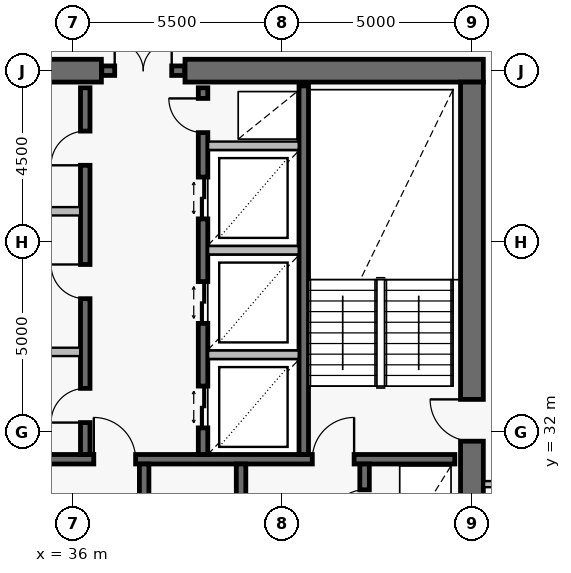
"""IFC4 building model, lengths in metres.
Left out: names, types, materials, properties, quantities, classifications, styles, units other than length and angle.
Written with IfcOpenShell. Run it as: python <this file> out.ifc"""

import sys

from ifc_helpers import new_model, si_unit, direction, frame, frame_2d, origin, place, context, subcontext, project, spatial, rectangle, extrude, element, fill, save


model = new_model("IFC4")
c1 = context("Model", 3, precision=1e-05, world=origin(), true_north=direction((0.0, 1.0)))
c2 = subcontext(c1, "Body", "Model", "MODEL_VIEW")
j1 = project(units=[si_unit("LENGTHUNIT", "METRE"), si_unit("PLANEANGLEUNIT", "RADIAN")], contexts=[c1])
p1 = place(None, origin())
s1 = spatial("IfcSite", under=j1, at=p1, CompositionType="ELEMENT")
p2 = place(p1, origin())
s2 = spatial("IfcBuilding", under=s1, at=p2, CompositionType="ELEMENT")
p3 = place(p2, frame((0.0, 0.0, 288.2)))
s3 = spatial("IfcBuildingStorey", under=s2, at=p3, CompositionType="ELEMENT", Elevation=288.2)
p4 = place(p3, frame((46.8, 41.5, 0.0), z_axis=(0.0, 0.0, 1.0), x_axis=(-1.0, 0.0, 0.0)))
e1 = element("IfcWall", 1, at=p4, inside=s3, PredefinedType="SHEAR", context=c2, shape_type="SweptSolid", body=[
    extrude(rectangle(XDim=7.85, YDim=0.6, at=frame_2d((3.925, 0.0))), origin(), (0.0, 0.0, 1.0), 3.8),
])
p5 = place(p3, frame((36.75, 41.5, 0.0), z_axis=(0.0, 0.0, 1.0), x_axis=(-1.0, 0.0, 0.0)))
e2 = element("IfcWall", 2, at=p5, inside=s3, PredefinedType="SHEAR", context=c2, shape_type="SweptSolid", body=[
    extrude(rectangle(XDim=11.55, YDim=0.6, at=frame_2d((5.775, 0.0))), origin(), (0.0, 0.0, 1.0), 3.8),
])
p6 = place(p5, frame((4.25, 0.0, 0.0)))
e3 = element("IfcOpeningElement", 3, at=p6, cuts=e2, PredefinedType="OPENING", context=c2, shape_type="SweptSolid", body=[
    extrude(rectangle(XDim=1.1, YDim=2.15, at=frame_2d((0.55, 1.075))), frame((0.0, 0.312, 0.0), z_axis=(0.0, -1.0, 0.0), x_axis=(1.0, 0.0, 0.0)), (0.0, 0.0, 1.0), 0.624),
])
p7 = place(p3, frame((46.5, 22.8, 0.0), z_axis=(0.0, 0.0, 1.0), x_axis=(0.0, 1.0, 0.0)))
e4 = element("IfcWall", 4, at=p7, inside=s3, PredefinedType="SHEAR", context=c2, shape_type="SweptSolid", body=[
    extrude(rectangle(XDim=18.4, YDim=0.6, at=frame_2d((9.2, 0.0))), origin(), (0.0, 0.0, 1.0), 3.8),
])
p8 = place(p7, frame((8.95, 0.0, 0.0)))
e5 = element("IfcOpeningElement", 5, at=p8, cuts=e4, PredefinedType="OPENING", context=c2, shape_type="SweptSolid", body=[
    extrude(rectangle(XDim=1.1, YDim=2.15, at=frame_2d((0.55, 1.075))), frame((0.0, 0.312, 0.0), z_axis=(0.0, -1.0, 0.0), x_axis=(1.0, 0.0, 0.0)), (0.0, 0.0, 1.0), 0.624),
])
p9 = place(p3, frame((36.76, 41.5, 0.0), z_axis=(0.0, 0.0, 1.0), x_axis=(1.0, 0.0, 0.0)))
e6 = element("IfcWall", 6, at=p9, inside=s3, PredefinedType="SOLIDWALL", context=c2, shape_type="SweptSolid", body=[
    extrude(rectangle(XDim=2.18, YDim=0.25, at=frame_2d((1.09, 0.0))), origin(), (0.0, 0.0, 1.0), 3.8),
])
p10 = place(p9, frame((0.34, 0.0, 0.0)))
e7 = element("IfcOpeningElement", 7, at=p10, cuts=e6, PredefinedType="OPENING", context=c2, shape_type="SweptSolid", body=[
    extrude(rectangle(XDim=1.5, YDim=2.15, at=frame_2d((0.75, 1.075))), frame((0.0, 0.137, 0.0), z_axis=(0.0, -1.0, 0.0), x_axis=(1.0, 0.0, 0.0)), (0.0, 0.0, 1.0), 0.274),
])
p11 = place(p3, frame((25.95, 31.275, 0.0), z_axis=(0.0, 0.0, 1.0), x_axis=(1.0, 0.0, 0.0)))
e8 = element("IfcWall", 8, at=p11, inside=s3, PredefinedType="SOLIDWALL", context=c2, shape_type="SweptSolid", body=[
    extrude(rectangle(XDim=20.1, YDim=0.25, at=frame_2d((10.05, 0.0))), origin(), (0.0, 0.0, 1.0), 3.8),
])
p12 = place(p11, frame((2.6, 0.0, 0.0)))
e9 = element("IfcOpeningElement", 9, at=p12, cuts=e8, PredefinedType="OPENING", context=c2, shape_type="SweptSolid", body=[
    extrude(rectangle(XDim=1.1, YDim=2.15, at=frame_2d((0.55, 1.075))), frame((0.0, 0.137, 0.0), z_axis=(0.0, -1.0, 0.0), x_axis=(1.0, 0.0, 0.0)), (0.0, 0.0, 1.0), 0.274),
])
p13 = place(p11, frame((10.6, 0.0, 0.0)))
e10 = element("IfcOpeningElement", 10, at=p13, cuts=e8, PredefinedType="OPENING", context=c2, shape_type="SweptSolid", body=[
    extrude(rectangle(XDim=1.1, YDim=2.15, at=frame_2d((0.55, 1.075))), frame((0.0, 0.137, 0.0), z_axis=(0.0, -1.0, 0.0), x_axis=(1.0, 0.0, 0.0)), (0.0, 0.0, 1.0), 0.274),
])
p14 = place(p11, frame((16.35, 0.0, 0.0)))
e11 = element("IfcOpeningElement", 11, at=p14, cuts=e8, PredefinedType="OPENING", context=c2, shape_type="SweptSolid", body=[
    extrude(rectangle(XDim=1.1, YDim=2.15, at=frame_2d((0.55, 1.075))), frame((0.0, 0.137, 0.0), z_axis=(0.0, -1.0, 0.0), x_axis=(1.0, 0.0, 0.0)), (0.0, 0.0, 1.0), 0.274),
])
p15 = place(p3, frame((42.075, 31.4, 0.0), z_axis=(0.0, 0.0, 1.0), x_axis=(0.0, 1.0, 0.0)))
e12 = element("IfcWall", 12, at=p15, inside=s3, PredefinedType="SOLIDWALL", context=c2, shape_type="SweptSolid", body=[
    extrude(rectangle(XDim=9.7, YDim=0.25, at=frame_2d((4.85, 0.0))), origin(), (0.0, 0.0, 1.0), 3.8),
])
p16 = place(p3, frame((36.325, 31.4, 0.0), z_axis=(0.0, 0.0, 1.0), x_axis=(0.0, 1.0, 0.0)))
e13 = element("IfcWall", 13, at=p16, inside=s3, PredefinedType="SOLIDWALL", context=c2, shape_type="SweptSolid", body=[
    extrude(rectangle(XDim=9.65, YDim=0.25, at=frame_2d((4.825, 0.0))), origin(), (0.0, 0.0, 1.0), 3.8),
])
p17 = place(p16, frame((0.84, 0.0, 0.0)))
e14 = element("IfcOpeningElement", 14, at=p17, cuts=e13, PredefinedType="OPENING", context=c2, shape_type="SweptSolid", body=[
    extrude(rectangle(XDim=0.9, YDim=2.1, at=frame_2d((0.45, 1.05))), frame((0.0, 0.137, 0.0), z_axis=(0.0, -1.0, 0.0), x_axis=(1.0, 0.0, 0.0)), (0.0, 0.0, 1.0), 0.274),
])
p18 = place(p16, frame((4.1, 0.0, 0.0)))
e15 = element("IfcOpeningElement", 15, at=p18, cuts=e13, PredefinedType="OPENING", context=c2, shape_type="SweptSolid", body=[
    extrude(rectangle(XDim=0.9, YDim=2.1, at=frame_2d((0.45, 1.05))), frame((0.0, 0.137, 0.0), z_axis=(0.0, -1.0, 0.0), x_axis=(1.0, 0.0, 0.0)), (0.0, 0.0, 1.0), 0.274),
])
p19 = place(p16, frame((7.61, 0.0, 0.0)))
e16 = element("IfcOpeningElement", 16, at=p19, cuts=e13, PredefinedType="OPENING", context=c2, shape_type="SweptSolid", body=[
    extrude(rectangle(XDim=0.9, YDim=2.1, at=frame_2d((0.45, 1.05))), frame((0.0, 0.137, 0.0), z_axis=(0.0, -1.0, 0.0), x_axis=(1.0, 0.0, 0.0)), (0.0, 0.0, 1.0), 0.274),
])
p20 = place(p3, frame((39.425, 31.4, 0.0), z_axis=(0.0, 0.0, 1.0), x_axis=(0.0, 1.0, 0.0)))
e17 = element("IfcWall", 17, at=p20, inside=s3, PredefinedType="SOLIDWALL", context=c2, shape_type="SweptSolid", body=[
    extrude(rectangle(XDim=9.65, YDim=0.25, at=frame_2d((4.825, 0.0))), origin(), (0.0, 0.0, 1.0), 3.8),
])
p21 = place(p20, frame((0.7, 0.0, 0.0)))
e18 = element("IfcOpeningElement", 18, at=p21, cuts=e17, PredefinedType="OPENING", context=c2, shape_type="SweptSolid", body=[
    extrude(rectangle(XDim=1.1, YDim=2.2, at=frame_2d((0.55, 1.1))), frame((0.0, 0.137, 0.0), z_axis=(0.0, -1.0, 0.0), x_axis=(1.0, 0.0, 0.0)), (0.0, 0.0, 1.0), 0.274),
])
p22 = place(p20, frame((3.45, 0.0, 0.0)))
e19 = element("IfcOpeningElement", 19, at=p22, cuts=e17, PredefinedType="OPENING", context=c2, shape_type="SweptSolid", body=[
    extrude(rectangle(XDim=1.1, YDim=2.2, at=frame_2d((0.55, 1.1))), frame((0.0, 0.137, 0.0), z_axis=(0.0, -1.0, 0.0), x_axis=(1.0, 0.0, 0.0)), (0.0, 0.0, 1.0), 0.274),
])
p23 = place(p20, frame((6.2, 0.0, 0.0)))
e20 = element("IfcOpeningElement", 20, at=p23, cuts=e17, PredefinedType="OPENING", context=c2, shape_type="SweptSolid", body=[
    extrude(rectangle(XDim=1.1, YDim=2.2, at=frame_2d((0.55, 1.1))), frame((0.0, 0.137, 0.0), z_axis=(0.0, -1.0, 0.0), x_axis=(1.0, 0.0, 0.0)), (0.0, 0.0, 1.0), 0.274),
])
p24 = place(p20, frame((8.47, 0.0, 0.0)))
e21 = element("IfcOpeningElement", 21, at=p24, cuts=e17, PredefinedType="OPENING", context=c2, shape_type="SweptSolid", body=[
    extrude(rectangle(XDim=0.9, YDim=2.1, at=frame_2d((0.45, 1.05))), frame((0.0, 0.137, 0.0), z_axis=(0.0, -1.0, 0.0), x_axis=(1.0, 0.0, 0.0)), (0.0, 0.0, 1.0), 0.274),
])
p25 = place(p3, frame((37.875, 22.95, 0.0), z_axis=(0.0, 0.0, 1.0), x_axis=(0.0, 1.0, 0.0)))
e22 = element("IfcWall", 22, at=p25, inside=s3, PredefinedType="SOLIDWALL", context=c2, shape_type="SweptSolid", body=[
    extrude(rectangle(XDim=8.2, YDim=0.25, at=frame_2d((4.1, 0.0))), origin(), (0.0, 0.0, 1.0), 3.8),
])
p26 = place(p25, frame((2.012, 0.0, 0.0)))
e23 = element("IfcOpeningElement", 23, at=p26, cuts=e22, PredefinedType="OPENING", context=c2, shape_type="SweptSolid", body=[
    extrude(rectangle(XDim=0.9, YDim=2.1, at=frame_2d((0.45, 1.05))), frame((0.0, 0.137, 0.0), z_axis=(0.0, -1.0, 0.0), x_axis=(1.0, 0.0, 0.0)), (0.0, 0.0, 1.0), 0.274),
])
p27 = place(p25, frame((6.212, 0.0, 0.0)))
e24 = element("IfcOpeningElement", 24, at=p27, cuts=e22, PredefinedType="OPENING", context=c2, shape_type="SweptSolid", body=[
    extrude(rectangle(XDim=0.9, YDim=2.1, at=frame_2d((0.45, 1.05))), frame((0.0, 0.137, 0.0), z_axis=(0.0, -1.0, 0.0), x_axis=(1.0, 0.0, 0.0)), (0.0, 0.0, 1.0), 0.274),
])
p28 = place(p3, frame((40.425, 22.95, 0.0), z_axis=(0.0, 0.0, 1.0), x_axis=(0.0, 1.0, 0.0)))
e25 = element("IfcWall", 25, at=p28, inside=s3, PredefinedType="SOLIDWALL", context=c2, shape_type="SweptSolid", body=[
    extrude(rectangle(XDim=8.2, YDim=0.25, at=frame_2d((4.1, 0.0))), origin(), (0.0, 0.0, 1.0), 3.8),
])
p29 = place(p3, frame((43.675, 22.95, 0.0), z_axis=(0.0, 0.0, 1.0), x_axis=(0.0, 1.0, 0.0)))
e26 = element("IfcWall", 26, at=p29, inside=s3, PredefinedType="SOLIDWALL", context=c2, shape_type="SweptSolid", body=[
    extrude(rectangle(XDim=8.2, YDim=0.25, at=frame_2d((4.1, 0.0))), origin(), (0.0, 0.0, 1.0), 3.8),
])
p30 = place(p29, frame((0.75, 0.0, 0.0)))
e27 = element("IfcOpeningElement", 27, at=p30, cuts=e26, PredefinedType="OPENING", context=c2, shape_type="SweptSolid", body=[
    extrude(rectangle(XDim=1.3, YDim=2.3, at=frame_2d((0.65, 1.15))), frame((0.0, 0.137, 0.0), z_axis=(0.0, -1.0, 0.0), x_axis=(1.0, 0.0, 0.0)), (0.0, 0.0, 1.0), 0.274),
])
p31 = place(p29, frame((3.7, 0.0, 0.0)))
e28 = element("IfcOpeningElement", 28, at=p31, cuts=e26, PredefinedType="OPENING", context=c2, shape_type="SweptSolid", body=[
    extrude(rectangle(XDim=1.3, YDim=2.3, at=frame_2d((0.65, 1.15))), frame((0.0, 0.137, 0.0), z_axis=(0.0, -1.0, 0.0), x_axis=(1.0, 0.0, 0.0)), (0.0, 0.0, 1.0), 0.274),
])
p32 = place(p29, frame((6.62, 0.0, 0.0)))
e29 = element("IfcOpeningElement", 29, at=p32, cuts=e26, PredefinedType="OPENING", context=c2, shape_type="SweptSolid", body=[
    extrude(rectangle(XDim=0.9, YDim=2.1, at=frame_2d((0.45, 1.05))), frame((0.0, 0.137, 0.0), z_axis=(0.0, -1.0, 0.0), x_axis=(1.0, 0.0, 0.0)), (0.0, 0.0, 1.0), 0.274),
])
p33 = place(p3, frame((46.82, 30.62, 0.0), z_axis=(0.0, 0.0, 1.0), x_axis=(1.0, 0.0, 0.0)))
e30 = element("IfcWall", 30, at=p33, inside=s3, PredefinedType="PARTITIONING", context=c2, shape_type="SweptSolid", body=[
    extrude(rectangle(XDim=2.03, YDim=0.16, at=frame_2d((1.015, 0.0))), origin(), (0.0, 0.0, 1.0), 3.55),
])
p34 = place(p33, frame((0.49, 0.0, 0.0)))
e31 = element("IfcOpeningElement", 31, at=p34, cuts=e30, PredefinedType="OPENING", context=c2, shape_type="SweptSolid", body=[
    extrude(rectangle(XDim=1.05, YDim=2.15, at=frame_2d((0.525, 1.075))), frame((0.0, 0.092, 0.0), z_axis=(0.0, -1.0, 0.0), x_axis=(1.0, 0.0, 0.0)), (0.0, 0.0, 1.0), 0.184),
])
for number, where, z_axis, x_axis in (
    (32, (34.108, 34.1, 0.0), (0.0, 0.0, 1.0), (1.0, 0.0, 0.0)),
    (33, (34.108, 37.8, 0.0), (0.0, 0.0, 1.0), (1.0, 0.0, 0.0)),
):
    element("IfcWall", number, at=place(p3, frame(where, z_axis=z_axis, x_axis=x_axis)), inside=s3, PredefinedType="PARTITIONING", context=c2, shape_type="SweptSolid", body=[
        extrude(rectangle(XDim=2.084, YDim=0.22, at=frame_2d((1.042, 0.0))), origin(), (0.0, 0.0, 1.0), 3.55),
    ])
for number, where, z_axis, x_axis in (
    (34, (39.558, 34.025, 0.0), (0.0, 0.0, 1.0), (1.0, 0.0, 0.0)),
    (35, (39.558, 36.775, 0.0), (0.0, 0.0, 1.0), (1.0, 0.0, 0.0)),
    (36, (39.558, 39.525, 0.0), (0.0, 0.0, 1.0), (1.0, 0.0, 0.0)),
):
    element("IfcWall", number, at=place(p3, frame(where, z_axis=z_axis, x_axis=x_axis)), inside=s3, PredefinedType="PARTITIONING", context=c2, shape_type="SweptSolid", body=[
        extrude(rectangle(XDim=2.384, YDim=0.22, at=frame_2d((1.192, 0.0))), origin(), (0.0, 0.0, 1.0), 3.55),
    ])
p35 = place(p8, origin())
e37 = element("IfcDoor", 37, at=p35, inside=s3, OperationType="SINGLE_SWING_RIGHT", PredefinedType="USERDEFINED", context=c2, shape_type="SweptSolid", body=[
    extrude(rectangle(XDim=1.1, YDim=2.15, at=frame_2d((0.55, 1.075))), frame((0.0, 0.025, 0.0), z_axis=(0.0, -1.0, 0.0), x_axis=(1.0, 0.0, 0.0)), (0.0, 0.0, 1.0), 0.05),
])
fill(e5, e37)
p36 = place(p10, origin())
e38 = element("IfcDoor", 38, at=p36, inside=s3, OperationType="DOUBLE_DOOR_SINGLE_SWING", PredefinedType="DOOR", context=c2, shape_type="SweptSolid", body=[
    extrude(rectangle(XDim=1.5, YDim=2.15, at=frame_2d((0.75, 1.075))), frame((0.0, 0.025, 0.0), z_axis=(0.0, -1.0, 0.0), x_axis=(1.0, 0.0, 0.0)), (0.0, 0.0, 1.0), 0.05),
])
fill(e7, e38)
p37 = place(p13, origin())
e39 = element("IfcDoor", 39, at=p37, inside=s3, OperationType="SINGLE_SWING_LEFT", PredefinedType="USERDEFINED", context=c2, shape_type="SweptSolid", body=[
    extrude(rectangle(XDim=1.1, YDim=2.15, at=frame_2d((0.55, 1.075))), frame((0.0, 0.025, 0.0), z_axis=(0.0, -1.0, 0.0), x_axis=(1.0, 0.0, 0.0)), (0.0, 0.0, 1.0), 0.05),
])
fill(e10, e39)
p38 = place(p14, origin())
e40 = element("IfcDoor", 40, at=p38, inside=s3, OperationType="SINGLE_SWING_RIGHT", PredefinedType="USERDEFINED", context=c2, shape_type="SweptSolid", body=[
    extrude(rectangle(XDim=1.1, YDim=2.15, at=frame_2d((0.55, 1.075))), frame((0.0, 0.025, 0.0), z_axis=(0.0, -1.0, 0.0), x_axis=(1.0, 0.0, 0.0)), (0.0, 0.0, 1.0), 0.05),
])
fill(e11, e40)
p39 = place(p17, origin())
e41 = element("IfcDoor", 41, at=p39, inside=s3, OperationType="SINGLE_SWING_LEFT", PredefinedType="DOOR", context=c2, shape_type="SweptSolid", body=[
    extrude(rectangle(XDim=0.9, YDim=2.1, at=frame_2d((0.45, 1.05))), frame((0.0, 0.025, 0.0), z_axis=(0.0, -1.0, 0.0), x_axis=(1.0, 0.0, 0.0)), (0.0, 0.0, 1.0), 0.05),
])
fill(e14, e41)
p40 = place(p18, origin())
e42 = element("IfcDoor", 42, at=p40, inside=s3, OperationType="SINGLE_SWING_RIGHT", PredefinedType="DOOR", context=c2, shape_type="SweptSolid", body=[
    extrude(rectangle(XDim=0.9, YDim=2.1, at=frame_2d((0.45, 1.05))), frame((0.0, 0.025, 0.0), z_axis=(0.0, -1.0, 0.0), x_axis=(1.0, 0.0, 0.0)), (0.0, 0.0, 1.0), 0.05),
])
fill(e15, e42)
p41 = place(p19, origin())
e43 = element("IfcDoor", 43, at=p41, inside=s3, OperationType="SINGLE_SWING_LEFT", PredefinedType="DOOR", context=c2, shape_type="SweptSolid", body=[
    extrude(rectangle(XDim=0.9, YDim=2.1, at=frame_2d((0.45, 1.05))), frame((0.0, 0.025, 0.0), z_axis=(0.0, -1.0, 0.0), x_axis=(1.0, 0.0, 0.0)), (0.0, 0.0, 1.0), 0.05),
])
fill(e16, e43)
p42 = place(p21, origin())
e44 = element("IfcDoor", 44, at=p42, inside=s3, OperationType="DOUBLE_DOOR_SLIDING", PredefinedType="DOOR", context=c2, shape_type="SweptSolid", body=[
    extrude(rectangle(XDim=1.1, YDim=2.2, at=frame_2d((0.55, 1.1))), frame((0.0, 0.025, 0.0), z_axis=(0.0, -1.0, 0.0), x_axis=(1.0, 0.0, 0.0)), (0.0, 0.0, 1.0), 0.05),
])
fill(e18, e44)
p43 = place(p22, origin())
e45 = element("IfcDoor", 45, at=p43, inside=s3, OperationType="DOUBLE_DOOR_SLIDING", PredefinedType="DOOR", context=c2, shape_type="SweptSolid", body=[
    extrude(rectangle(XDim=1.1, YDim=2.2, at=frame_2d((0.55, 1.1))), frame((0.0, 0.025, 0.0), z_axis=(0.0, -1.0, 0.0), x_axis=(1.0, 0.0, 0.0)), (0.0, 0.0, 1.0), 0.05),
])
fill(e19, e45)
p44 = place(p23, origin())
e46 = element("IfcDoor", 46, at=p44, inside=s3, OperationType="DOUBLE_DOOR_SLIDING", PredefinedType="DOOR", context=c2, shape_type="SweptSolid", body=[
    extrude(rectangle(XDim=1.1, YDim=2.2, at=frame_2d((0.55, 1.1))), frame((0.0, 0.025, 0.0), z_axis=(0.0, -1.0, 0.0), x_axis=(1.0, 0.0, 0.0)), (0.0, 0.0, 1.0), 0.05),
])
fill(e20, e46)
p45 = place(p24, origin())
e47 = element("IfcDoor", 47, at=p45, inside=s3, OperationType="SINGLE_SWING_RIGHT", PredefinedType="DOOR", context=c2, shape_type="SweptSolid", body=[
    extrude(rectangle(XDim=0.9, YDim=2.1, at=frame_2d((0.45, 1.05))), frame((0.0, 0.025, 0.0), z_axis=(0.0, -1.0, 0.0), x_axis=(1.0, 0.0, 0.0)), (0.0, 0.0, 1.0), 0.05),
])
fill(e21, e47)
p46 = place(p32, origin())
e48 = element("IfcDoor", 48, at=p46, inside=s3, OperationType="SINGLE_SWING_LEFT", PredefinedType="DOOR", context=c2, shape_type="SweptSolid", body=[
    extrude(rectangle(XDim=0.9, YDim=2.1, at=frame_2d((0.45, 1.05))), frame((0.0, 0.025, 0.0), z_axis=(0.0, -1.0, 0.0), x_axis=(1.0, 0.0, 0.0)), (0.0, 0.0, 1.0), 0.05),
])
fill(e29, e48)
save(model, sys.argv[1])
